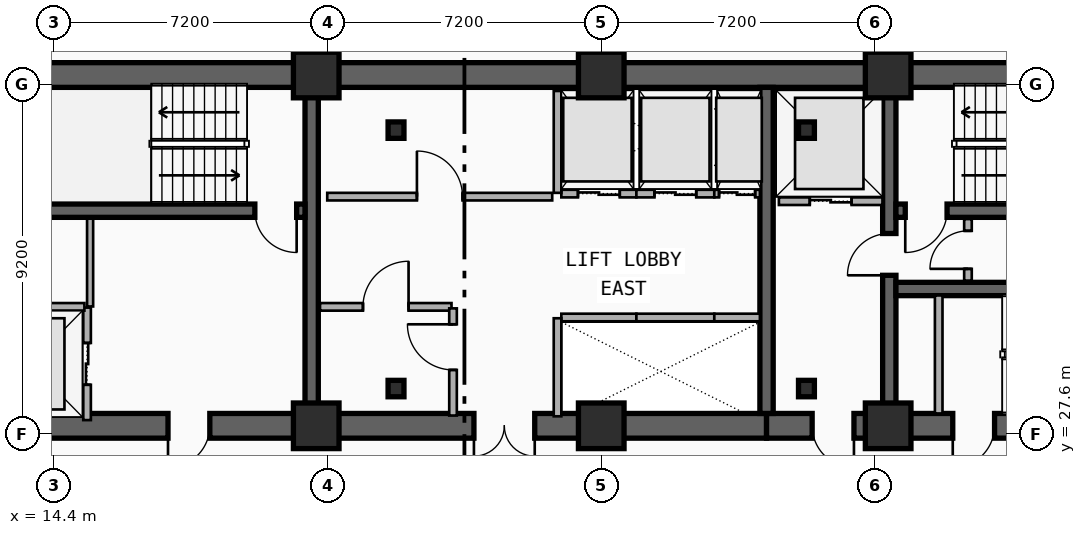
"""IFC4 building model, lengths in metres.
Left out: names, types, materials, properties, quantities, classifications, styles, units other than length and angle.
Written with IfcOpenShell. Run it as: python <this file> out.ifc"""

import sys

from ifc_helpers import new_model, si_unit, direction, frame, frame_2d, origin, origin_2d, place, context, subcontext, project, spatial, rectangle, i_section, extrude, element, fill, save


model = new_model("IFC4")
c1 = context("Model", 3, precision=1e-05, world=origin(), true_north=direction((0.0, 1.0)))
c2 = subcontext(c1, "Body", "Model", "MODEL_VIEW")
j1 = project(units=[si_unit("LENGTHUNIT", "METRE"), si_unit("PLANEANGLEUNIT", "RADIAN")], contexts=[c1])
p1 = place(None, origin())
s1 = spatial("IfcSite", under=j1, at=p1, CompositionType="ELEMENT")
p2 = place(p1, origin())
s2 = spatial("IfcBuilding", under=s1, at=p2, CompositionType="ELEMENT")
p3 = place(p2, frame((0.0, 0.0, 129.3)))
s3 = spatial("IfcBuildingStorey", under=s2, at=p3, CompositionType="ELEMENT", Elevation=129.3)
p4 = place(p3, frame((12.15, 37.05, 0.0), z_axis=(0.0, 0.0, 1.0), x_axis=(1.0, 0.0, 0.0)))
e1 = element("IfcWall", 1, at=p4, inside=s3, PredefinedType="SHEAR", context=c2, shape_type="SweptSolid", body=[
    extrude(rectangle(XDim=33.23, YDim=0.65, at=frame_2d((16.615, 0.0))), origin(), (0.0, 0.0, 1.0), 3.6),
])
p5 = place(p3, frame((21.18, 27.82, 0.0), z_axis=(0.0, 0.0, 1.0), x_axis=(-1.0, 0.0, 0.0)))
e2 = element("IfcWall", 2, at=p5, inside=s3, PredefinedType="SHEAR", context=c2, shape_type="SweptSolid", body=[
    extrude(rectangle(XDim=9.03, YDim=0.65, at=frame_2d((4.515, 0.0))), origin(), (0.0, 0.0, 1.0), 3.6),
])
p6 = place(p5, frame((2.68, 0.0, 0.0)))
e3 = element("IfcOpeningElement", 3, at=p6, cuts=e2, PredefinedType="OPENING", context=c2, shape_type="SweptSolid", body=[
    extrude(rectangle(XDim=1.1, YDim=2.15, at=frame_2d((0.55, 1.075))), frame((0.0, 0.335, 0.0), z_axis=(0.0, -1.0, 0.0), x_axis=(1.0, 0.0, 0.0)), (0.0, 0.0, 1.0), 0.67),
])
p7 = place(p3, frame((33.15, 27.82, 0.0), z_axis=(0.0, 0.0, 1.0), x_axis=(-1.0, 0.0, 0.0)))
e4 = element("IfcWall", 4, at=p7, inside=s3, PredefinedType="SHEAR", context=c2, shape_type="SweptSolid", body=[
    extrude(rectangle(XDim=11.97, YDim=0.65, at=frame_2d((5.985, 0.0))), origin(), (0.0, 0.0, 1.0), 3.6),
])
p8 = place(p7, frame((6.1, 0.0, 0.0)))
e5 = element("IfcOpeningElement", 5, at=p8, cuts=e4, PredefinedType="OPENING", context=c2, shape_type="SweptSolid", body=[
    extrude(rectangle(XDim=1.6, YDim=2.2, at=frame_2d((0.8, 1.1))), frame((0.0, 0.335, 0.0), z_axis=(0.0, -1.0, 0.0), x_axis=(1.0, 0.0, 0.0)), (0.0, 0.0, 1.0), 0.67),
])
p9 = place(p3, frame((45.38, 27.82, 0.0), z_axis=(0.0, 0.0, 1.0), x_axis=(-1.0, 0.0, 0.0)))
e6 = element("IfcWall", 6, at=p9, inside=s3, PredefinedType="SHEAR", context=c2, shape_type="SweptSolid", body=[
    extrude(rectangle(XDim=12.23, YDim=0.65, at=frame_2d((6.115, 0.0))), origin(), (0.0, 0.0, 1.0), 3.6),
])
p10 = place(p9, frame((9.93, 0.0, 0.0)))
e7 = element("IfcOpeningElement", 7, at=p10, cuts=e6, PredefinedType="OPENING", context=c2, shape_type="SweptSolid", body=[
    extrude(rectangle(XDim=1.1, YDim=2.15, at=frame_2d((0.55, 1.075))), frame((0.0, 0.335, 0.0), z_axis=(0.0, -1.0, 0.0), x_axis=(1.0, 0.0, 0.0)), (0.0, 0.0, 1.0), 0.67),
])
p11 = place(p9, frame((6.23, 0.0, 0.0)))
e8 = element("IfcOpeningElement", 8, at=p11, cuts=e6, PredefinedType="OPENING", context=c2, shape_type="SweptSolid", body=[
    extrude(rectangle(XDim=1.1, YDim=2.15, at=frame_2d((0.55, 1.075))), frame((0.0, 0.335, 0.0), z_axis=(0.0, -1.0, 0.0), x_axis=(1.0, 0.0, 0.0)), (0.0, 0.0, 1.0), 0.67),
])
for number, where, z_axis, x_axis in (
    (9, (21.18, 28.145, 0.0), (0.0, 0.0, 1.0), (0.0, 1.0, 0.0)),
    (10, (33.15, 28.145, 0.0), (0.0, 0.0, 1.0), (0.0, 1.0, 0.0)),
):
    element("IfcWall", number, at=place(p3, frame(where, z_axis=z_axis, x_axis=x_axis)), inside=s3, PredefinedType="SHEAR", context=c2, shape_type="SweptSolid", body=[
        extrude(rectangle(XDim=8.58, YDim=0.35, at=frame_2d((4.29, 0.0))), origin(), (0.0, 0.0, 1.0), 3.6),
    ])
p12 = place(p3, frame((36.38, 28.145, 0.0), z_axis=(0.0, 0.0, 1.0), x_axis=(0.0, 1.0, 0.0)))
e11 = element("IfcWall", 11, at=p12, inside=s3, PredefinedType="SHEAR", context=c2, shape_type="SweptSolid", body=[
    extrude(rectangle(XDim=8.58, YDim=0.35, at=frame_2d((4.29, 0.0))), origin(), (0.0, 0.0, 1.0), 3.6),
])
p13 = place(p12, frame((3.635, 0.0, 0.0)))
e12 = element("IfcOpeningElement", 12, at=p13, cuts=e11, PredefinedType="OPENING", context=c2, shape_type="SweptSolid", body=[
    extrude(rectangle(XDim=1.1, YDim=2.15, at=frame_2d((0.55, 1.075))), frame((0.0, 0.185, 0.0), z_axis=(0.0, -1.0, 0.0), x_axis=(1.0, 0.0, 0.0)), (0.0, 0.0, 1.0), 0.37),
])
p14 = place(p3, frame((21.005, 33.48, 0.0), z_axis=(0.0, 0.0, 1.0), x_axis=(-1.0, 0.0, 0.0)))
e13 = element("IfcWall", 13, at=p14, inside=s3, PredefinedType="SHEAR", context=c2, shape_type="SweptSolid", body=[
    extrude(rectangle(XDim=8.53, YDim=0.35, at=frame_2d((4.265, 0.0))), origin(), (0.0, 0.0, 1.0), 3.6),
])
p15 = place(p14, frame((0.22, 0.0, 0.0)))
e14 = element("IfcOpeningElement", 14, at=p15, cuts=e13, PredefinedType="OPENING", context=c2, shape_type="SweptSolid", body=[
    extrude(rectangle(XDim=1.1, YDim=2.15, at=frame_2d((0.55, 1.075))), frame((0.0, 0.185, 0.0), z_axis=(0.0, -1.0, 0.0), x_axis=(1.0, 0.0, 0.0)), (0.0, 0.0, 1.0), 0.37),
])
p16 = place(p3, frame((45.055, 33.48, 0.0), z_axis=(0.0, 0.0, 1.0), x_axis=(-1.0, 0.0, 0.0)))
e15 = element("IfcWall", 15, at=p16, inside=s3, PredefinedType="SHEAR", context=c2, shape_type="SweptSolid", body=[
    extrude(rectangle(XDim=8.5, YDim=0.35, at=frame_2d((4.25, 0.0))), origin(), (0.0, 0.0, 1.0), 3.6),
])
p17 = place(p16, frame((7.155, 0.0, 0.0)))
e16 = element("IfcOpeningElement", 16, at=p17, cuts=e15, PredefinedType="OPENING", context=c2, shape_type="SweptSolid", body=[
    extrude(rectangle(XDim=1.1, YDim=2.15, at=frame_2d((0.55, 1.075))), frame((0.0, 0.185, 0.0), z_axis=(0.0, -1.0, 0.0), x_axis=(1.0, 0.0, 0.0)), (0.0, 0.0, 1.0), 0.37),
])
p18 = place(p3, frame((36.555, 31.42, 0.0), z_axis=(0.0, 0.0, 1.0), x_axis=(1.0, 0.0, 0.0)))
e17 = element("IfcWall", 17, at=p18, inside=s3, PredefinedType="SHEAR", context=c2, shape_type="SweptSolid", body=[
    extrude(rectangle(XDim=8.5, YDim=0.35, at=frame_2d((4.25, 0.0))), origin(), (0.0, 0.0, 1.0), 3.6),
])
for number, where, z_axis, x_axis in (
    (18, (23.4, 28.8, 0.0), (0.0, 0.0, 1.0), (1.0, 0.0, 0.0)),
    (19, (34.2, 28.8, 0.0), (0.0, 0.0, 1.0), (1.0, 0.0, 0.0)),
    (20, (34.2, 35.6, 0.0), (0.0, 0.0, 1.0), (1.0, 0.0, 0.0)),
    (21, (23.4, 35.6, 0.0), (0.0, 0.0, 1.0), (1.0, 0.0, 0.0)),
):
    element("IfcColumn", number, at=place(p3, frame(where, z_axis=z_axis, x_axis=x_axis)), inside=s3, PredefinedType="COLUMN", context=c2, shape_type="SweptSolid", body=[
        extrude(i_section(OverallWidth=0.418, OverallDepth=0.432, WebThickness=0.035, FlangeThickness=0.056, FilletRadius=0.015, at=origin_2d()), origin(), (0.0, 0.0, 1.0), 3.6),
    ])
for number, where, z_axis, x_axis in (
    (22, (21.3, 27.82, 0.0), (0.0, 0.0, 1.0), (1.0, 0.0, 0.0)),
    (23, (21.3, 37.05, 0.0), (0.0, 0.0, 1.0), (1.0, 0.0, 0.0)),
    (24, (28.8, 27.82, 0.0), (0.0, 0.0, 1.0), (1.0, 0.0, 0.0)),
    (25, (28.8, 37.05, 0.0), (0.0, 0.0, 1.0), (1.0, 0.0, 0.0)),
    (26, (36.35, 27.82, 0.0), (0.0, 0.0, 1.0), (1.0, 0.0, 0.0)),
    (27, (36.35, 37.05, 0.0), (0.0, 0.0, 1.0), (1.0, 0.0, 0.0)),
):
    element("IfcColumn", number, at=place(p3, frame(where, z_axis=z_axis, x_axis=x_axis)), inside=s3, PredefinedType="COLUMN", context=c2, shape_type="SweptSolid", body=[
        extrude(rectangle(XDim=1.2, YDim=1.2, at=origin_2d()), origin(), (0.0, 0.0, 1.0), 3.6),
    ])
p19 = place(p3, frame((15.27, 27.97, 0.0), z_axis=(0.0, 0.0, 1.0), x_axis=(0.0, 1.0, 0.0)))
e28 = element("IfcWall", 28, at=p19, inside=s3, PredefinedType="PARTITIONING", context=c2, shape_type="SweptSolid", body=[
    extrude(rectangle(XDim=2.96, YDim=0.2, at=frame_2d((1.48, 0.0))), origin(), (0.0, 0.0, 1.0), 2.252),
])
p20 = place(p19, frame((0.93, 0.0, 0.0)))
e29 = element("IfcOpeningElement", 29, at=p20, cuts=e28, PredefinedType="OPENING", context=c2, shape_type="SweptSolid", body=[
    extrude(rectangle(XDim=1.1, YDim=2.15, at=frame_2d((0.55, 1.075))), frame((0.0, 0.11, 0.0), z_axis=(0.0, -1.0, 0.0), x_axis=(1.0, 0.0, 0.0)), (0.0, 0.0, 1.0), 0.22),
])
p21 = place(p3, frame((12.45, 30.95, 0.0), z_axis=(0.0, 0.0, 1.0), x_axis=(1.0, 0.0, 0.0)))
e30 = element("IfcWall", 30, at=p21, inside=s3, PredefinedType="PARTITIONING", context=c2, shape_type="SweptSolid", body=[
    extrude(rectangle(XDim=2.75, YDim=0.2, at=frame_2d((1.375, 0.0))), origin(), (0.0, 0.0, 1.0), 2.252),
])
p22 = place(p3, frame((33.475, 33.73, 0.0), z_axis=(0.0, 0.0, 1.0), x_axis=(1.0, 0.0, 0.0)))
e31 = element("IfcWall", 31, at=p22, inside=s3, PredefinedType="PARTITIONING", context=c2, shape_type="SweptSolid", body=[
    extrude(rectangle(XDim=2.725, YDim=0.2, at=frame_2d((1.362, 0.0))), origin(), (0.0, 0.0, 1.0), 2.252),
])
p23 = place(p22, frame((0.812, 0.0, 0.0)))
e32 = element("IfcOpeningElement", 32, at=p23, cuts=e31, PredefinedType="OPENING", context=c2, shape_type="SweptSolid", body=[
    extrude(rectangle(XDim=1.1, YDim=2.15, at=frame_2d((0.55, 1.075))), frame((0.0, 0.11, 0.0), z_axis=(0.0, -1.0, 0.0), x_axis=(1.0, 0.0, 0.0)), (0.0, 0.0, 1.0), 0.22),
])
p24 = place(p3, frame((27.75, 30.67, 0.0), z_axis=(0.0, 0.0, 1.0), x_axis=(1.0, 0.0, 0.0)))
e33 = element("IfcWall", 33, at=p24, inside=s3, PredefinedType="PARTITIONING", context=c2, shape_type="SweptSolid", body=[
    extrude(rectangle(XDim=1.975, YDim=0.2, at=frame_2d((0.988, 0.0))), origin(), (0.0, 0.0, 1.0), 2.252),
])
p25 = place(p3, frame((27.65, 28.07, 0.0), z_axis=(0.0, 0.0, 1.0), x_axis=(0.0, 1.0, 0.0)))
e34 = element("IfcWall", 34, at=p25, inside=s3, PredefinedType="PARTITIONING", context=c2, shape_type="SweptSolid", body=[
    extrude(rectangle(XDim=2.58, YDim=0.2, at=frame_2d((1.29, 0.0))), origin(), (0.0, 0.0, 1.0), 2.252),
])
p26 = place(p3, frame((29.725, 30.67, 0.0), z_axis=(0.0, 0.0, 1.0), x_axis=(1.0, 0.0, 0.0)))
e35 = element("IfcWall", 35, at=p26, inside=s3, PredefinedType="PARTITIONING", context=c2, shape_type="SweptSolid", body=[
    extrude(rectangle(XDim=2.05, YDim=0.2, at=frame_2d((1.025, 0.0))), origin(), (0.0, 0.0, 1.0), 2.66),
])
p27 = place(p3, frame((31.775, 30.67, 0.0), z_axis=(0.0, 0.0, 1.0), x_axis=(1.0, 0.0, 0.0)))
e36 = element("IfcWall", 36, at=p27, inside=s3, PredefinedType="PARTITIONING", context=c2, shape_type="SweptSolid", body=[
    extrude(rectangle(XDim=1.2, YDim=0.2, at=frame_2d((0.6, 0.0))), origin(), (0.0, 0.0, 1.0), 2.66),
])
p28 = place(p3, frame((27.75, 33.93, 0.0), z_axis=(0.0, 0.0, 1.0), x_axis=(1.0, 0.0, 0.0)))
e37 = element("IfcWall", 37, at=p28, inside=s3, PredefinedType="PARTITIONING", context=c2, shape_type="SweptSolid", body=[
    extrude(rectangle(XDim=1.975, YDim=0.2, at=frame_2d((0.988, 0.0))), origin(), (0.0, 0.0, 1.0), 2.252),
])
p29 = place(p28, frame((0.438, 0.0, 0.0)))
e38 = element("IfcOpeningElement", 38, at=p29, cuts=e37, PredefinedType="OPENING", context=c2, shape_type="SweptSolid", body=[
    extrude(rectangle(XDim=1.1, YDim=2.15, at=frame_2d((0.55, 1.075))), frame((0.0, 0.11, 0.0), z_axis=(0.0, -1.0, 0.0), x_axis=(1.0, 0.0, 0.0)), (0.0, 0.0, 1.0), 0.22),
])
p30 = place(p3, frame((27.65, 33.95, 0.0), z_axis=(0.0, 0.0, 1.0), x_axis=(0.0, 1.0, 0.0)))
e39 = element("IfcWall", 39, at=p30, inside=s3, PredefinedType="PARTITIONING", context=c2, shape_type="SweptSolid", body=[
    extrude(rectangle(XDim=2.68, YDim=0.2, at=frame_2d((1.34, 0.0))), origin(), (0.0, 0.0, 1.0), 2.252),
])
p31 = place(p3, frame((29.725, 33.93, 0.0), z_axis=(0.0, 0.0, 1.0), x_axis=(1.0, 0.0, 0.0)))
e40 = element("IfcWall", 40, at=p31, inside=s3, PredefinedType="PARTITIONING", context=c2, shape_type="SweptSolid", body=[
    extrude(rectangle(XDim=2.05, YDim=0.2, at=frame_2d((1.025, 0.0))), origin(), (0.0, 0.0, 1.0), 3.28),
])
p32 = place(p31, frame((0.475, 0.0, 0.0)))
e41 = element("IfcOpeningElement", 41, at=p32, cuts=e40, PredefinedType="OPENING", context=c2, shape_type="SweptSolid", body=[
    extrude(rectangle(XDim=1.1, YDim=2.15, at=frame_2d((0.55, 1.075))), frame((0.0, 0.11, 0.0), z_axis=(0.0, -1.0, 0.0), x_axis=(1.0, 0.0, 0.0)), (0.0, 0.0, 1.0), 0.22),
])
p33 = place(p3, frame((31.775, 33.93, 0.0), z_axis=(0.0, 0.0, 1.0), x_axis=(1.0, 0.0, 0.0)))
e42 = element("IfcWall", 42, at=p33, inside=s3, PredefinedType="PARTITIONING", context=c2, shape_type="SweptSolid", body=[
    extrude(rectangle(XDim=1.2, YDim=0.2, at=frame_2d((0.6, 0.0))), origin(), (0.0, 0.0, 1.0), 3.28),
])
p34 = place(p33, frame((0.125, 0.0, 0.0)))
e43 = element("IfcOpeningElement", 43, at=p34, cuts=e42, PredefinedType="OPENING", context=c2, shape_type="SweptSolid", body=[
    extrude(rectangle(XDim=0.95, YDim=2.15, at=frame_2d((0.475, 1.075))), frame((0.0, 0.11, 0.0), z_axis=(0.0, -1.0, 0.0), x_axis=(1.0, 0.0, 0.0)), (0.0, 0.0, 1.0), 0.22),
])
p35 = place(p3, frame((37.68, 28.145, 0.0), z_axis=(0.0, 0.0, 1.0), x_axis=(0.0, 1.0, 0.0)))
e44 = element("IfcWall", 44, at=p35, inside=s3, PredefinedType="PARTITIONING", context=c2, shape_type="SweptSolid", body=[
    extrude(rectangle(XDim=3.105, YDim=0.2, at=frame_2d((1.552, 0.0))), origin(), (0.0, 0.0, 1.0), 2.66),
])
p36 = place(p3, frame((38.45, 31.64, 0.0), z_axis=(0.0, 0.0, 1.0), x_axis=(0.0, 1.0, 0.0)))
e45 = element("IfcWall", 45, at=p36, inside=s3, PredefinedType="PARTITIONING", context=c2, shape_type="SweptSolid", body=[
    extrude(rectangle(XDim=1.62, YDim=0.2, at=frame_2d((0.81, 0.0))), origin(), (0.0, 0.0, 1.0), 3.28),
])
p37 = place(p36, frame((0.31, 0.0, 0.0)))
e46 = element("IfcOpeningElement", 46, at=p37, cuts=e45, PredefinedType="OPENING", context=c2, shape_type="SweptSolid", body=[
    extrude(rectangle(XDim=1.0, YDim=2.15, at=frame_2d((0.5, 1.075))), frame((0.0, 0.11, 0.0), z_axis=(0.0, -1.0, 0.0), x_axis=(1.0, 0.0, 0.0)), (0.0, 0.0, 1.0), 0.22),
])
p38 = place(p3, frame((21.4, 30.95, 0.0), z_axis=(0.0, 0.0, 1.0), x_axis=(1.0, 0.0, 0.0)))
e47 = element("IfcWall", 47, at=p38, inside=s3, PredefinedType="PARTITIONING", context=c2, shape_type="SweptSolid", body=[
    extrude(rectangle(XDim=3.46, YDim=0.2, at=frame_2d((1.73, 0.0))), origin(), (0.0, 0.0, 1.0), 2.252),
])
p39 = place(p38, frame((1.13, 0.0, 0.0)))
e48 = element("IfcOpeningElement", 48, at=p39, cuts=e47, PredefinedType="OPENING", context=c2, shape_type="SweptSolid", body=[
    extrude(rectangle(XDim=1.2, YDim=2.15, at=frame_2d((0.6, 1.075))), frame((0.0, 0.11, 0.0), z_axis=(0.0, -1.0, 0.0), x_axis=(1.0, 0.0, 0.0)), (0.0, 0.0, 1.0), 0.22),
])
p40 = place(p3, frame((21.59, 33.85, 0.0), z_axis=(0.0, 0.0, 1.0), x_axis=(1.0, 0.0, 0.0)))
e49 = element("IfcWall", 49, at=p40, inside=s3, PredefinedType="PARTITIONING", context=c2, shape_type="SweptSolid", body=[
    extrude(rectangle(XDim=5.92, YDim=0.2, at=frame_2d((2.96, 0.0))), origin(), (0.0, 0.0, 1.0), 2.252),
])
p41 = place(p40, frame((2.36, 0.0, 0.0)))
e50 = element("IfcOpeningElement", 50, at=p41, cuts=e49, PredefinedType="OPENING", context=c2, shape_type="SweptSolid", body=[
    extrude(rectangle(XDim=1.2, YDim=2.15, at=frame_2d((0.6, 1.075))), frame((0.0, 0.11, 0.0), z_axis=(0.0, -1.0, 0.0), x_axis=(1.0, 0.0, 0.0)), (0.0, 0.0, 1.0), 0.22),
])
p42 = place(p3, frame((24.9, 28.09, 0.0), z_axis=(0.0, 0.0, 1.0), x_axis=(0.0, 1.0, 0.0)))
e51 = element("IfcWall", 51, at=p42, inside=s3, PredefinedType="PARTITIONING", context=c2, shape_type="SweptSolid", body=[
    extrude(rectangle(XDim=2.82, YDim=0.2, at=frame_2d((1.41, 0.0))), origin(), (0.0, 0.0, 1.0), 2.66),
])
p43 = place(p42, frame((1.201, 0.0, 0.0)))
e52 = element("IfcOpeningElement", 52, at=p43, cuts=e51, PredefinedType="OPENING", context=c2, shape_type="SweptSolid", body=[
    extrude(rectangle(XDim=1.2, YDim=2.15, at=frame_2d((0.6, 1.075))), frame((0.0, 0.11, 0.0), z_axis=(0.0, -1.0, 0.0), x_axis=(1.0, 0.0, 0.0)), (0.0, 0.0, 1.0), 0.22),
])
p44 = place(p3, frame((15.35, 30.96, 0.0), z_axis=(0.0, 0.0, 1.0), x_axis=(0.0, 1.0, 0.0)))
e53 = element("IfcWall", 53, at=p44, inside=s3, PredefinedType="PARTITIONING", context=c2, shape_type="SweptSolid", body=[
    extrude(rectangle(XDim=2.31, YDim=0.16, at=frame_2d((1.155, 0.0))), origin(), (0.0, 0.0, 1.0), 3.28),
])
p45 = place(p20, origin())
e54 = element("IfcDoor", 54, at=p45, inside=s3, OperationType="DOUBLE_DOOR_SLIDING", PredefinedType="DOOR", context=c2, shape_type="SweptSolid", body=[
    extrude(rectangle(XDim=1.1, YDim=2.15, at=frame_2d((0.55, 1.075))), frame((0.0, 0.025, 0.0), z_axis=(0.0, -1.0, 0.0), x_axis=(1.0, 0.0, 0.0)), (0.0, 0.0, 1.0), 0.05),
])
fill(e29, e54)
p46 = place(p23, origin())
e55 = element("IfcDoor", 55, at=p46, inside=s3, OperationType="DOUBLE_DOOR_SLIDING", PredefinedType="DOOR", context=c2, shape_type="SweptSolid", body=[
    extrude(rectangle(XDim=1.1, YDim=2.15, at=frame_2d((0.55, 1.075))), frame((0.0, 0.025, 0.0), z_axis=(0.0, -1.0, 0.0), x_axis=(1.0, 0.0, 0.0)), (0.0, 0.0, 1.0), 0.05),
])
fill(e32, e55)
p47 = place(p29, origin())
e56 = element("IfcDoor", 56, at=p47, inside=s3, OperationType="DOUBLE_DOOR_SLIDING", PredefinedType="DOOR", context=c2, shape_type="SweptSolid", body=[
    extrude(rectangle(XDim=1.1, YDim=2.15, at=frame_2d((0.55, 1.075))), frame((0.0, 0.025, 0.0), z_axis=(0.0, -1.0, 0.0), x_axis=(1.0, 0.0, 0.0)), (0.0, 0.0, 1.0), 0.05),
])
fill(e38, e56)
p48 = place(p32, origin())
e57 = element("IfcDoor", 57, at=p48, inside=s3, OperationType="DOUBLE_DOOR_SLIDING", PredefinedType="DOOR", context=c2, shape_type="SweptSolid", body=[
    extrude(rectangle(XDim=1.1, YDim=2.15, at=frame_2d((0.55, 1.075))), frame((0.0, 0.025, 0.0), z_axis=(0.0, -1.0, 0.0), x_axis=(1.0, 0.0, 0.0)), (0.0, 0.0, 1.0), 0.05),
])
fill(e41, e57)
p49 = place(p34, origin())
e58 = element("IfcDoor", 58, at=p49, inside=s3, OperationType="DOUBLE_DOOR_SLIDING", PredefinedType="DOOR", context=c2, shape_type="SweptSolid", body=[
    extrude(rectangle(XDim=0.95, YDim=2.15, at=frame_2d((0.475, 1.075))), frame((0.0, 0.025, 0.0), z_axis=(0.0, -1.0, 0.0), x_axis=(1.0, 0.0, 0.0)), (0.0, 0.0, 1.0), 0.05),
])
fill(e43, e58)
p50 = place(p15, origin())
e59 = element("IfcDoor", 59, at=p50, inside=s3, OperationType="SINGLE_SWING_LEFT", PredefinedType="DOOR", context=c2, shape_type="SweptSolid", body=[
    extrude(rectangle(XDim=1.1, YDim=2.15, at=frame_2d((0.55, 1.075))), frame((0.0, 0.025, 0.0), z_axis=(0.0, -1.0, 0.0), x_axis=(1.0, 0.0, 0.0)), (0.0, 0.0, 1.0), 0.05),
])
fill(e14, e59)
p51 = place(p6, origin())
e60 = element("IfcDoor", 60, at=p51, inside=s3, OperationType="SINGLE_SWING_RIGHT", PredefinedType="DOOR", context=c2, shape_type="SweptSolid", body=[
    extrude(rectangle(XDim=1.1, YDim=2.15, at=frame_2d((0.55, 1.075))), frame((0.0, 0.025, 0.0), z_axis=(0.0, -1.0, 0.0), x_axis=(1.0, 0.0, 0.0)), (0.0, 0.0, 1.0), 0.05),
])
fill(e3, e60)
p52 = place(p17, origin())
e61 = element("IfcDoor", 61, at=p52, inside=s3, OperationType="SINGLE_SWING_RIGHT", PredefinedType="DOOR", context=c2, shape_type="SweptSolid", body=[
    extrude(rectangle(XDim=1.1, YDim=2.15, at=frame_2d((0.55, 1.075))), frame((0.0, 0.025, 0.0), z_axis=(0.0, -1.0, 0.0), x_axis=(1.0, 0.0, 0.0)), (0.0, 0.0, 1.0), 0.05),
])
fill(e16, e61)
p53 = place(p13, origin())
e62 = element("IfcDoor", 62, at=p53, inside=s3, OperationType="SINGLE_SWING_LEFT", PredefinedType="DOOR", context=c2, shape_type="SweptSolid", body=[
    extrude(rectangle(XDim=1.1, YDim=2.15, at=frame_2d((0.55, 1.075))), frame((0.0, 0.025, 0.0), z_axis=(0.0, -1.0, 0.0), x_axis=(1.0, 0.0, 0.0)), (0.0, 0.0, 1.0), 0.05),
])
fill(e12, e62)
p54 = place(p10, origin())
e63 = element("IfcDoor", 63, at=p54, inside=s3, OperationType="SINGLE_SWING_LEFT", PredefinedType="DOOR", context=c2, shape_type="SweptSolid", body=[
    extrude(rectangle(XDim=1.1, YDim=2.15, at=frame_2d((0.55, 1.075))), frame((0.0, 0.025, 0.0), z_axis=(0.0, -1.0, 0.0), x_axis=(1.0, 0.0, 0.0)), (0.0, 0.0, 1.0), 0.05),
])
fill(e7, e63)
p55 = place(p11, origin())
e64 = element("IfcDoor", 64, at=p55, inside=s3, OperationType="SINGLE_SWING_RIGHT", PredefinedType="DOOR", context=c2, shape_type="SweptSolid", body=[
    extrude(rectangle(XDim=1.1, YDim=2.15, at=frame_2d((0.55, 1.075))), frame((0.0, 0.025, 0.0), z_axis=(0.0, -1.0, 0.0), x_axis=(1.0, 0.0, 0.0)), (0.0, 0.0, 1.0), 0.05),
])
fill(e8, e64)
p56 = place(p8, origin())
e65 = element("IfcDoor", 65, at=p56, inside=s3, OperationType="SINGLE_SWING_LEFT", PredefinedType="DOOR", context=c2, shape_type="SweptSolid", body=[
    extrude(rectangle(XDim=1.6, YDim=2.2, at=frame_2d((0.8, 1.1))), frame((0.0, 0.025, 0.0), z_axis=(0.0, -1.0, 0.0), x_axis=(1.0, 0.0, 0.0)), (0.0, 0.0, 1.0), 0.05),
])
fill(e5, e65)
p57 = place(p37, origin())
e66 = element("IfcDoor", 66, at=p57, inside=s3, OperationType="SINGLE_SWING_LEFT", PredefinedType="DOOR", context=c2, shape_type="SweptSolid", body=[
    extrude(rectangle(XDim=1.0, YDim=2.15, at=frame_2d((0.5, 1.075))), frame((0.0, 0.025, 0.0), z_axis=(0.0, -1.0, 0.0), x_axis=(1.0, 0.0, 0.0)), (0.0, 0.0, 1.0), 0.05),
])
fill(e46, e66)
p58 = place(p39, origin())
e67 = element("IfcDoor", 67, at=p58, inside=s3, OperationType="SINGLE_SWING_RIGHT", PredefinedType="DOOR", context=c2, shape_type="SweptSolid", body=[
    extrude(rectangle(XDim=1.2, YDim=2.15, at=frame_2d((0.6, 1.075))), frame((0.0, 0.025, 0.0), z_axis=(0.0, -1.0, 0.0), x_axis=(1.0, 0.0, 0.0)), (0.0, 0.0, 1.0), 0.05),
])
fill(e48, e67)
p59 = place(p41, origin())
e68 = element("IfcDoor", 68, at=p59, inside=s3, OperationType="SINGLE_SWING_LEFT", PredefinedType="DOOR", context=c2, shape_type="SweptSolid", body=[
    extrude(rectangle(XDim=1.2, YDim=2.15, at=frame_2d((0.6, 1.075))), frame((0.0, 0.025, 0.0), z_axis=(0.0, -1.0, 0.0), x_axis=(1.0, 0.0, 0.0)), (0.0, 0.0, 1.0), 0.05),
])
fill(e50, e68)
p60 = place(p43, origin())
e69 = element("IfcDoor", 69, at=p60, inside=s3, OperationType="SINGLE_SWING_RIGHT", PredefinedType="DOOR", context=c2, shape_type="SweptSolid", body=[
    extrude(rectangle(XDim=1.2, YDim=2.15, at=frame_2d((0.6, 1.075))), frame((0.0, 0.025, 0.0), z_axis=(0.0, -1.0, 0.0), x_axis=(1.0, 0.0, 0.0)), (0.0, 0.0, 1.0), 0.05),
])
fill(e52, e69)
save(model, sys.argv[1])
